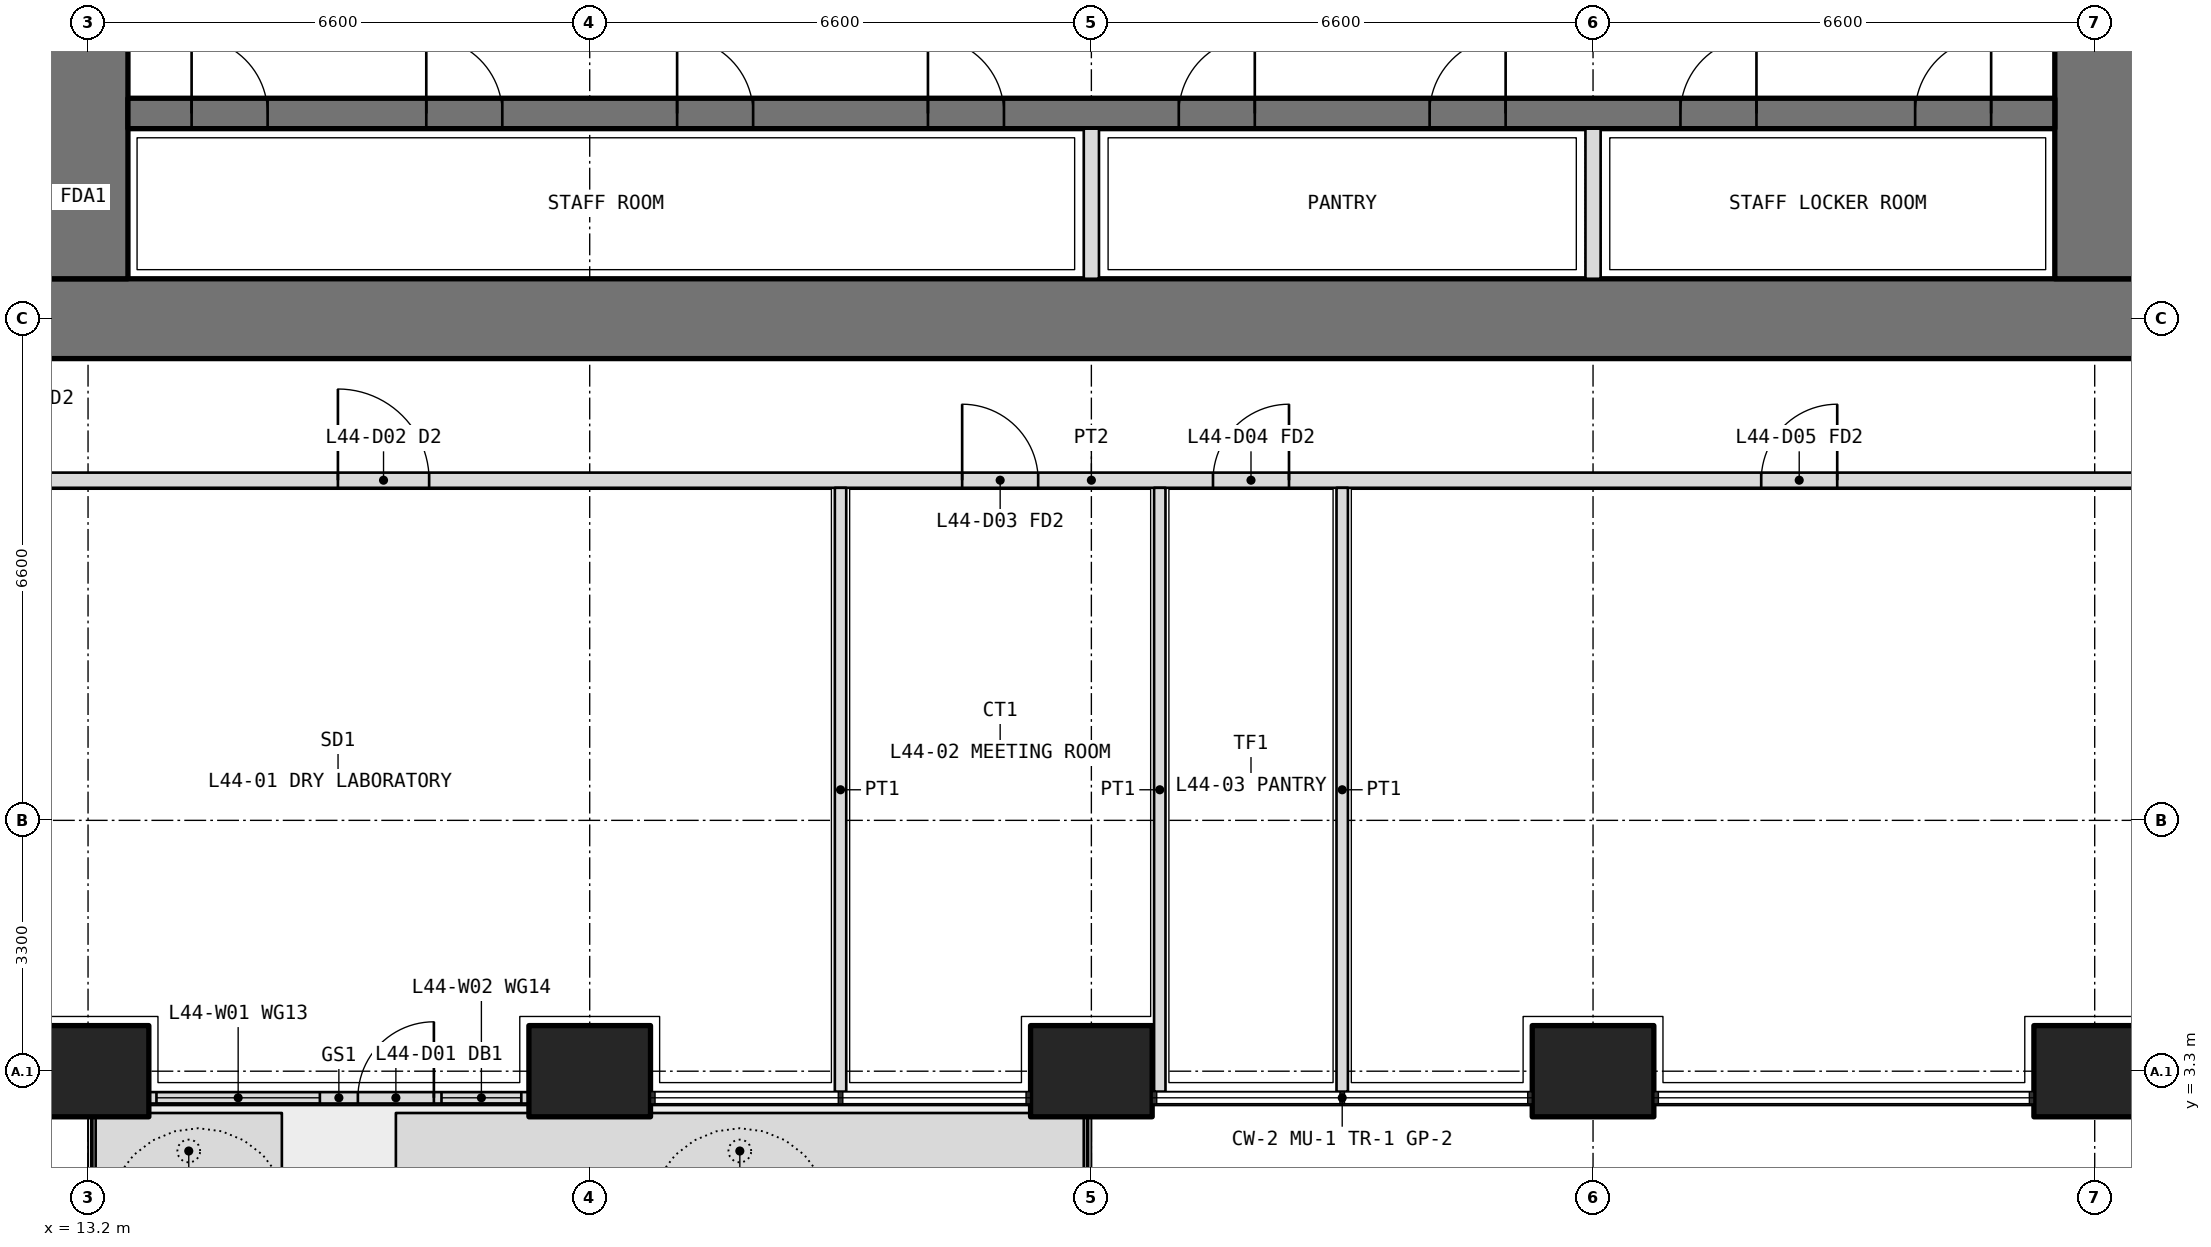
"""IFC4 building model, lengths in metres.
Left out: names, types, materials, properties, quantities, classifications, styles, units other than length and angle.
Written with IfcOpenShell. Run it as: python <this file> out.ifc"""

import sys

from ifc_helpers import new_model, si_unit, direction, frame, frame_2d, origin, origin_2d, place, context, subcontext, project, spatial, polyline, rectangle, outline, extrude, element, fill, save


model = new_model("IFC4")
c1 = context("Model", 3, precision=1e-05, world=origin(), true_north=direction((0.0, 1.0)))
c2 = subcontext(c1, "Body", "Model", "MODEL_VIEW")
j1 = project(units=[si_unit("LENGTHUNIT", "METRE"), si_unit("PLANEANGLEUNIT", "RADIAN")], contexts=[c1])
p1 = place(None, origin())
s1 = spatial("IfcSite", under=j1, at=p1, CompositionType="ELEMENT")
p2 = place(p1, origin())
s2 = spatial("IfcBuilding", under=s1, at=p2, CompositionType="ELEMENT")
p3 = place(p2, frame((0.0, 0.0, 193.5)))
s3 = spatial("IfcBuildingStorey", under=s2, at=p3, CompositionType="ELEMENT", Elevation=193.5)
for number, where, z_axis, x_axis in (
    (1, (13.2, 3.3, 0.0), (0.0, 0.0, 1.0), (1.0, 0.0, 0.0)),
    (2, (19.8, 3.3, 0.0), (0.0, 0.0, 1.0), (1.0, 0.0, 0.0)),
    (3, (26.4, 3.3, 0.0), (0.0, 0.0, 1.0), (1.0, 0.0, 0.0)),
    (4, (33.0, 3.3, 0.0), (0.0, 0.0, 1.0), (1.0, 0.0, 0.0)),
    (5, (39.6, 3.3, 0.0), (0.0, 0.0, 1.0), (1.0, 0.0, 0.0)),
):
    element("IfcColumn", number, at=place(p3, frame(where, z_axis=z_axis, x_axis=x_axis)), inside=s3, PredefinedType="COLUMN", context=c2, shape_type="SweptSolid", body=[
        extrude(rectangle(XDim=1.6, YDim=1.2, at=origin_2d()), origin(), (0.0, 0.0, 1.0), 4.2),
    ])
p4 = place(p3, origin())
e6 = element("IfcWall", 6, at=p4, inside=s3, PredefinedType="USERDEFINED", context=c2, shape_type="SweptSolid", body=[
    extrude(outline(polyline([(13.3, 1.75), (15.75, 1.75), (15.75, 2.75), (13.3, 2.75), (13.3, 1.75)]), holes=[polyline([(13.45, 1.9), (15.6, 1.9), (15.6, 2.6), (13.45, 2.6), (13.45, 1.9)])]), origin(), (0.0, 0.0, 1.0), 1.05),
])
p5 = place(p3, origin())
e7 = element("IfcWall", 7, at=p5, inside=s3, PredefinedType="USERDEFINED", context=c2, shape_type="SweptSolid", body=[
    extrude(outline(polyline([(17.25, 1.75), (26.3, 1.75), (26.3, 2.75), (17.25, 2.75), (17.25, 1.75)]), holes=[polyline([(17.4, 1.9), (26.15, 1.9), (26.15, 2.6), (17.4, 2.6), (17.4, 1.9)])]), origin(), (0.0, 0.0, 1.0), 1.05),
])
p6 = place(p3, frame((14.0, 2.95, 0.0), z_axis=(0.0, 0.0, 1.0), x_axis=(1.0, 0.0, 0.0)))
e8 = element("IfcWall", 8, at=p6, inside=s3, PredefinedType="SOLIDWALL", context=c2, shape_type="SweptSolid", body=[
    extrude(rectangle(XDim=5.0, YDim=0.15, at=frame_2d((2.5, 0.0))), origin(), (0.0, 0.0, 1.0), 2.7),
])
p7 = place(p6, frame((2.75, 0.0, 0.0)))
e9 = element("IfcOpeningElement", 9, at=p7, cuts=e8, PredefinedType="OPENING", context=c2, shape_type="SweptSolid", body=[
    extrude(rectangle(XDim=1.0, YDim=2.4, at=frame_2d((0.5, 1.2))), frame((0.0, 0.085, 0.0), z_axis=(0.0, -1.0, 0.0), x_axis=(1.0, 0.0, 0.0)), (0.0, 0.0, 1.0), 0.17),
])
p8 = place(p6, frame((0.1, 0.0, 0.1)))
e10 = element("IfcOpeningElement", 10, at=p8, cuts=e8, PredefinedType="OPENING", context=c2, shape_type="SweptSolid", body=[
    extrude(rectangle(XDim=2.15, YDim=2.3, at=frame_2d((1.075, 1.15))), frame((0.0, 0.085, 0.0), z_axis=(0.0, -1.0, 0.0), x_axis=(1.0, 0.0, 0.0)), (0.0, 0.0, 1.0), 0.17),
])
p9 = place(p6, frame((3.85, 0.0, 0.1)))
e11 = element("IfcOpeningElement", 11, at=p9, cuts=e8, PredefinedType="OPENING", context=c2, shape_type="SweptSolid", body=[
    extrude(rectangle(XDim=1.05, YDim=2.3, at=frame_2d((0.525, 1.15))), frame((0.0, 0.085, 0.0), z_axis=(0.0, -1.0, 0.0), x_axis=(1.0, 0.0, 0.0)), (0.0, 0.0, 1.0), 0.17),
])
p10 = place(p3, frame((12.675, 13.2, 0.0), z_axis=(0.0, 0.0, 1.0), x_axis=(1.0, 0.0, 0.0)))
e12 = element("IfcWall", 12, at=p10, inside=s3, PredefinedType="SHEAR", context=c2, shape_type="SweptSolid", body=[
    extrude(rectangle(XDim=27.45, YDim=1.05, at=frame_2d((13.725, 0.0))), origin(), (0.0, 0.0, 1.0), 4.2),
])
p11 = place(p3, frame((39.6, 13.725, 0.0), z_axis=(0.0, 0.0, 1.0), x_axis=(0.0, 1.0, 0.0)))
e13 = element("IfcWall", 13, at=p11, inside=s3, PredefinedType="SHEAR", context=c2, shape_type="SweptSolid", body=[
    extrude(rectangle(XDim=18.75, YDim=1.05, at=frame_2d((9.375, 0.0))), origin(), (0.0, 0.0, 1.0), 4.2),
])
p12 = place(p11, frame((3.025, 0.0, 0.0)))
e14 = element("IfcOpeningElement", 14, at=p12, cuts=e13, PredefinedType="OPENING", context=c2, shape_type="SweptSolid", body=[
    extrude(rectangle(XDim=1.6, YDim=2.1, at=frame_2d((0.8, 1.05))), frame((0.0, 0.535, 0.0), z_axis=(0.0, -1.0, 0.0), x_axis=(1.0, 0.0, 0.0)), (0.0, 0.0, 1.0), 1.07),
])
p13 = place(p11, frame((13.825, 0.0, 0.0)))
e15 = element("IfcOpeningElement", 15, at=p13, cuts=e13, PredefinedType="OPENING", context=c2, shape_type="SweptSolid", body=[
    extrude(rectangle(XDim=1.6, YDim=2.1, at=frame_2d((0.8, 1.05))), frame((0.0, 0.535, 0.0), z_axis=(0.0, -1.0, 0.0), x_axis=(1.0, 0.0, 0.0)), (0.0, 0.0, 1.0), 1.07),
])
p14 = place(p3, frame((13.2, 32.475, 0.0), z_axis=(0.0, 0.0, 1.0), x_axis=(0.0, -1.0, 0.0)))
e16 = element("IfcWall", 16, at=p14, inside=s3, PredefinedType="SHEAR", context=c2, shape_type="SweptSolid", body=[
    extrude(rectangle(XDim=18.75, YDim=1.05, at=frame_2d((9.375, 0.0))), origin(), (0.0, 0.0, 1.0), 4.2),
])
p15 = place(p14, frame((14.125, 0.0, 0.0)))
e17 = element("IfcOpeningElement", 17, at=p15, cuts=e16, PredefinedType="OPENING", context=c2, shape_type="SweptSolid", body=[
    extrude(rectangle(XDim=1.6, YDim=2.1, at=frame_2d((0.8, 1.05))), frame((0.0, 0.535, 0.0), z_axis=(0.0, -1.0, 0.0), x_axis=(1.0, 0.0, 0.0)), (0.0, 0.0, 1.0), 1.07),
])
p16 = place(p14, frame((3.325, 0.0, 0.0)))
e18 = element("IfcOpeningElement", 18, at=p16, cuts=e16, PredefinedType="OPENING", context=c2, shape_type="SweptSolid", body=[
    extrude(rectangle(XDim=1.6, YDim=2.1, at=frame_2d((0.8, 1.05))), frame((0.0, 0.535, 0.0), z_axis=(0.0, -1.0, 0.0), x_axis=(1.0, 0.0, 0.0)), (0.0, 0.0, 1.0), 1.07),
])
p17 = place(p3, frame((13.725, 15.9, 0.0), z_axis=(0.0, 0.0, 1.0), x_axis=(1.0, 0.0, 0.0)))
e19 = element("IfcWall", 19, at=p17, inside=s3, PredefinedType="SHEAR", context=c2, shape_type="SweptSolid", body=[
    extrude(rectangle(XDim=25.35, YDim=0.4, at=frame_2d((12.675, 0.0))), origin(), (0.0, 0.0, 1.0), 4.2),
])
p18 = place(p17, frame((0.837, 0.0, 0.0)))
e20 = element("IfcOpeningElement", 20, at=p18, cuts=e19, PredefinedType="OPENING", context=c2, shape_type="SweptSolid", body=[
    extrude(rectangle(XDim=1.0, YDim=2.1, at=frame_2d((0.5, 1.05))), frame((0.0, 0.21, 0.0), z_axis=(0.0, -1.0, 0.0), x_axis=(1.0, 0.0, 0.0)), (0.0, 0.0, 1.0), 0.42),
])
p19 = place(p17, frame((3.925, 0.0, 0.0)))
e21 = element("IfcOpeningElement", 21, at=p19, cuts=e19, PredefinedType="OPENING", context=c2, shape_type="SweptSolid", body=[
    extrude(rectangle(XDim=1.0, YDim=2.1, at=frame_2d((0.5, 1.05))), frame((0.0, 0.21, 0.0), z_axis=(0.0, -1.0, 0.0), x_axis=(1.0, 0.0, 0.0)), (0.0, 0.0, 1.0), 0.42),
])
p20 = place(p17, frame((7.225, 0.0, 0.0)))
e22 = element("IfcOpeningElement", 22, at=p20, cuts=e19, PredefinedType="OPENING", context=c2, shape_type="SweptSolid", body=[
    extrude(rectangle(XDim=1.0, YDim=2.1, at=frame_2d((0.5, 1.05))), frame((0.0, 0.21, 0.0), z_axis=(0.0, -1.0, 0.0), x_axis=(1.0, 0.0, 0.0)), (0.0, 0.0, 1.0), 0.42),
])
p21 = place(p17, frame((10.525, 0.0, 0.0)))
e23 = element("IfcOpeningElement", 23, at=p21, cuts=e19, PredefinedType="OPENING", context=c2, shape_type="SweptSolid", body=[
    extrude(rectangle(XDim=1.0, YDim=2.1, at=frame_2d((0.5, 1.05))), frame((0.0, 0.21, 0.0), z_axis=(0.0, -1.0, 0.0), x_axis=(1.0, 0.0, 0.0)), (0.0, 0.0, 1.0), 0.42),
])
p22 = place(p17, frame((13.825, 0.0, 0.0)))
e24 = element("IfcOpeningElement", 24, at=p22, cuts=e19, PredefinedType="OPENING", context=c2, shape_type="SweptSolid", body=[
    extrude(rectangle(XDim=1.0, YDim=2.1, at=frame_2d((0.5, 1.05))), frame((0.0, 0.21, 0.0), z_axis=(0.0, -1.0, 0.0), x_axis=(1.0, 0.0, 0.0)), (0.0, 0.0, 1.0), 0.42),
])
p23 = place(p17, frame((17.125, 0.0, 0.0)))
e25 = element("IfcOpeningElement", 25, at=p23, cuts=e19, PredefinedType="OPENING", context=c2, shape_type="SweptSolid", body=[
    extrude(rectangle(XDim=1.0, YDim=2.1, at=frame_2d((0.5, 1.05))), frame((0.0, 0.21, 0.0), z_axis=(0.0, -1.0, 0.0), x_axis=(1.0, 0.0, 0.0)), (0.0, 0.0, 1.0), 0.42),
])
p24 = place(p17, frame((20.425, 0.0, 0.0)))
e26 = element("IfcOpeningElement", 26, at=p24, cuts=e19, PredefinedType="OPENING", context=c2, shape_type="SweptSolid", body=[
    extrude(rectangle(XDim=1.0, YDim=2.1, at=frame_2d((0.5, 1.05))), frame((0.0, 0.21, 0.0), z_axis=(0.0, -1.0, 0.0), x_axis=(1.0, 0.0, 0.0)), (0.0, 0.0, 1.0), 0.42),
])
p25 = place(p17, frame((23.512, 0.0, 0.0)))
e27 = element("IfcOpeningElement", 27, at=p25, cuts=e19, PredefinedType="OPENING", context=c2, shape_type="SweptSolid", body=[
    extrude(rectangle(XDim=1.0, YDim=2.1, at=frame_2d((0.5, 1.05))), frame((0.0, 0.21, 0.0), z_axis=(0.0, -1.0, 0.0), x_axis=(1.0, 0.0, 0.0)), (0.0, 0.0, 1.0), 0.42),
])
for number, where, z_axis, x_axis in (
    (28, (26.4, 13.725, 0.0), (0.0, 0.0, 1.0), (0.0, 1.0, 0.0)),
    (29, (33.0, 13.725, 0.0), (0.0, 0.0, 1.0), (0.0, 1.0, 0.0)),
):
    element("IfcWall", number, at=place(p3, frame(where, z_axis=z_axis, x_axis=x_axis)), inside=s3, PredefinedType="PARTITIONING", context=c2, shape_type="SweptSolid", body=[
        extrude(rectangle(XDim=1.975, YDim=0.2, at=frame_2d((0.987, 0.0))), origin(), (0.0, 0.0, 1.0), 4.2),
    ])
p26 = place(p3, frame((10.975, 11.075, 0.0), z_axis=(0.0, 0.0, 1.0), x_axis=(1.0, 0.0, 0.0)))
e30 = element("IfcWall", 30, at=p26, inside=s3, PredefinedType="PARTITIONING", context=c2, shape_type="SweptSolid", body=[
    extrude(rectangle(XDim=30.85, YDim=0.2, at=frame_2d((15.425, 0.0))), origin(), (0.0, 0.0, 1.0), 2.85),
])
p27 = place(p26, frame((5.512, 0.0, 0.0)))
e31 = element("IfcOpeningElement", 31, at=p27, cuts=e30, PredefinedType="OPENING", context=c2, shape_type="SweptSolid", body=[
    extrude(rectangle(XDim=1.2, YDim=2.1, at=frame_2d((0.6, 1.05))), frame((0.0, 0.11, 0.0), z_axis=(0.0, -1.0, 0.0), x_axis=(1.0, 0.0, 0.0)), (0.0, 0.0, 1.0), 0.22),
])
p28 = place(p26, frame((13.725, 0.0, 0.0)))
e32 = element("IfcOpeningElement", 32, at=p28, cuts=e30, PredefinedType="OPENING", context=c2, shape_type="SweptSolid", body=[
    extrude(rectangle(XDim=1.0, YDim=2.1, at=frame_2d((0.5, 1.05))), frame((0.0, 0.11, 0.0), z_axis=(0.0, -1.0, 0.0), x_axis=(1.0, 0.0, 0.0)), (0.0, 0.0, 1.0), 0.22),
])
p29 = place(p26, frame((17.025, 0.0, 0.0)))
e33 = element("IfcOpeningElement", 33, at=p29, cuts=e30, PredefinedType="OPENING", context=c2, shape_type="SweptSolid", body=[
    extrude(rectangle(XDim=1.0, YDim=2.1, at=frame_2d((0.5, 1.05))), frame((0.0, 0.11, 0.0), z_axis=(0.0, -1.0, 0.0), x_axis=(1.0, 0.0, 0.0)), (0.0, 0.0, 1.0), 0.22),
])
p30 = place(p26, frame((24.238, 0.0, 0.0)))
e34 = element("IfcOpeningElement", 34, at=p30, cuts=e30, PredefinedType="OPENING", context=c2, shape_type="SweptSolid", body=[
    extrude(rectangle(XDim=1.0, YDim=2.1, at=frame_2d((0.5, 1.05))), frame((0.0, 0.11, 0.0), z_axis=(0.0, -1.0, 0.0), x_axis=(1.0, 0.0, 0.0)), (0.0, 0.0, 1.0), 0.22),
])
for number, where, z_axis, x_axis in (
    (35, (27.3, 3.03, 0.0), (0.0, 0.0, 1.0), (0.0, 1.0, 0.0)),
    (36, (29.7, 3.03, 0.0), (0.0, 0.0, 1.0), (0.0, 1.0, 0.0)),
    (37, (23.1, 3.03, 0.0), (0.0, 0.0, 1.0), (0.0, 1.0, 0.0)),
):
    element("IfcWall", number, at=place(p3, frame(where, z_axis=z_axis, x_axis=x_axis)), inside=s3, PredefinedType="PARTITIONING", context=c2, shape_type="SweptSolid", body=[
        extrude(rectangle(XDim=7.945, YDim=0.15, at=frame_2d((3.973, 0.0))), origin(), (0.0, 0.0, 1.0), 2.7),
    ])
p31 = place(p7, origin())
e38 = element("IfcDoor", 38, at=p31, inside=s3, OperationType="SINGLE_SWING_RIGHT", PredefinedType="DOOR", context=c2, shape_type="SweptSolid", body=[
    extrude(rectangle(XDim=1.0, YDim=2.4, at=frame_2d((0.5, 1.2))), frame((0.0, 0.025, 0.0), z_axis=(0.0, -1.0, 0.0), x_axis=(1.0, 0.0, 0.0)), (0.0, 0.0, 1.0), 0.05),
])
fill(e9, e38)
p32 = place(p8, origin())
e39 = element("IfcWindow", 39, at=p32, inside=s3, PartitioningType="SINGLE_PANEL", PredefinedType="WINDOW", context=c2, shape_type="SweptSolid", body=[
    extrude(rectangle(XDim=2.15, YDim=2.3, at=frame_2d((1.075, 1.15))), frame((0.0, 0.03, 0.0), z_axis=(0.0, -1.0, 0.0), x_axis=(1.0, 0.0, 0.0)), (0.0, 0.0, 1.0), 0.06),
])
fill(e10, e39)
p33 = place(p9, origin())
e40 = element("IfcWindow", 40, at=p33, inside=s3, PartitioningType="SINGLE_PANEL", PredefinedType="WINDOW", context=c2, shape_type="SweptSolid", body=[
    extrude(rectangle(XDim=1.05, YDim=2.3, at=frame_2d((0.525, 1.15))), frame((0.0, 0.03, 0.0), z_axis=(0.0, -1.0, 0.0), x_axis=(1.0, 0.0, 0.0)), (0.0, 0.0, 1.0), 0.06),
])
fill(e11, e40)
p34 = place(p27, origin())
e41 = element("IfcDoor", 41, at=p34, inside=s3, OperationType="DOUBLE_DOOR_SINGLE_SWING", PredefinedType="DOOR", context=c2, shape_type="SweptSolid", body=[
    extrude(rectangle(XDim=1.2, YDim=2.1, at=frame_2d((0.6, 1.05))), frame((0.0, 0.025, 0.0), z_axis=(0.0, -1.0, 0.0), x_axis=(1.0, 0.0, 0.0)), (0.0, 0.0, 1.0), 0.05),
])
fill(e31, e41)
p35 = place(p28, origin())
e42 = element("IfcDoor", 42, at=p35, inside=s3, OperationType="SINGLE_SWING_LEFT", PredefinedType="DOOR", context=c2, shape_type="SweptSolid", body=[
    extrude(rectangle(XDim=1.0, YDim=2.1, at=frame_2d((0.5, 1.05))), frame((0.0, 0.025, 0.0), z_axis=(0.0, -1.0, 0.0), x_axis=(1.0, 0.0, 0.0)), (0.0, 0.0, 1.0), 0.05),
])
fill(e32, e42)
p36 = place(p29, origin())
e43 = element("IfcDoor", 43, at=p36, inside=s3, OperationType="SINGLE_SWING_RIGHT", PredefinedType="DOOR", context=c2, shape_type="SweptSolid", body=[
    extrude(rectangle(XDim=1.0, YDim=2.1, at=frame_2d((0.5, 1.05))), frame((0.0, 0.025, 0.0), z_axis=(0.0, -1.0, 0.0), x_axis=(1.0, 0.0, 0.0)), (0.0, 0.0, 1.0), 0.05),
])
fill(e33, e43)
p37 = place(p30, origin())
e44 = element("IfcDoor", 44, at=p37, inside=s3, OperationType="SINGLE_SWING_RIGHT", PredefinedType="DOOR", context=c2, shape_type="SweptSolid", body=[
    extrude(rectangle(XDim=1.0, YDim=2.1, at=frame_2d((0.5, 1.05))), frame((0.0, 0.025, 0.0), z_axis=(0.0, -1.0, 0.0), x_axis=(1.0, 0.0, 0.0)), (0.0, 0.0, 1.0), 0.05),
])
fill(e34, e44)
p38 = place(p18, origin())
e45 = element("IfcDoor", 45, at=p38, inside=s3, OperationType="SINGLE_SWING_LEFT", PredefinedType="DOOR", context=c2, shape_type="SweptSolid", body=[
    extrude(rectangle(XDim=1.0, YDim=2.1, at=frame_2d((0.5, 1.05))), frame((0.0, 0.025, 0.0), z_axis=(0.0, -1.0, 0.0), x_axis=(1.0, 0.0, 0.0)), (0.0, 0.0, 1.0), 0.05),
])
fill(e20, e45)
p39 = place(p19, origin())
e46 = element("IfcDoor", 46, at=p39, inside=s3, OperationType="SINGLE_SWING_LEFT", PredefinedType="DOOR", context=c2, shape_type="SweptSolid", body=[
    extrude(rectangle(XDim=1.0, YDim=2.1, at=frame_2d((0.5, 1.05))), frame((0.0, 0.025, 0.0), z_axis=(0.0, -1.0, 0.0), x_axis=(1.0, 0.0, 0.0)), (0.0, 0.0, 1.0), 0.05),
])
fill(e21, e46)
p40 = place(p20, origin())
e47 = element("IfcDoor", 47, at=p40, inside=s3, OperationType="SINGLE_SWING_LEFT", PredefinedType="DOOR", context=c2, shape_type="SweptSolid", body=[
    extrude(rectangle(XDim=1.0, YDim=2.1, at=frame_2d((0.5, 1.05))), frame((0.0, 0.025, 0.0), z_axis=(0.0, -1.0, 0.0), x_axis=(1.0, 0.0, 0.0)), (0.0, 0.0, 1.0), 0.05),
])
fill(e22, e47)
p41 = place(p21, origin())
e48 = element("IfcDoor", 48, at=p41, inside=s3, OperationType="SINGLE_SWING_LEFT", PredefinedType="DOOR", context=c2, shape_type="SweptSolid", body=[
    extrude(rectangle(XDim=1.0, YDim=2.1, at=frame_2d((0.5, 1.05))), frame((0.0, 0.025, 0.0), z_axis=(0.0, -1.0, 0.0), x_axis=(1.0, 0.0, 0.0)), (0.0, 0.0, 1.0), 0.05),
])
fill(e23, e48)
p42 = place(p22, origin())
e49 = element("IfcDoor", 49, at=p42, inside=s3, OperationType="SINGLE_SWING_RIGHT", PredefinedType="DOOR", context=c2, shape_type="SweptSolid", body=[
    extrude(rectangle(XDim=1.0, YDim=2.1, at=frame_2d((0.5, 1.05))), frame((0.0, 0.025, 0.0), z_axis=(0.0, -1.0, 0.0), x_axis=(1.0, 0.0, 0.0)), (0.0, 0.0, 1.0), 0.05),
])
fill(e24, e49)
p43 = place(p23, origin())
e50 = element("IfcDoor", 50, at=p43, inside=s3, OperationType="SINGLE_SWING_RIGHT", PredefinedType="DOOR", context=c2, shape_type="SweptSolid", body=[
    extrude(rectangle(XDim=1.0, YDim=2.1, at=frame_2d((0.5, 1.05))), frame((0.0, 0.025, 0.0), z_axis=(0.0, -1.0, 0.0), x_axis=(1.0, 0.0, 0.0)), (0.0, 0.0, 1.0), 0.05),
])
fill(e25, e50)
p44 = place(p24, origin())
e51 = element("IfcDoor", 51, at=p44, inside=s3, OperationType="SINGLE_SWING_RIGHT", PredefinedType="DOOR", context=c2, shape_type="SweptSolid", body=[
    extrude(rectangle(XDim=1.0, YDim=2.1, at=frame_2d((0.5, 1.05))), frame((0.0, 0.025, 0.0), z_axis=(0.0, -1.0, 0.0), x_axis=(1.0, 0.0, 0.0)), (0.0, 0.0, 1.0), 0.05),
])
fill(e26, e51)
p45 = place(p25, origin())
e52 = element("IfcDoor", 52, at=p45, inside=s3, OperationType="SINGLE_SWING_RIGHT", PredefinedType="DOOR", context=c2, shape_type="SweptSolid", body=[
    extrude(rectangle(XDim=1.0, YDim=2.1, at=frame_2d((0.5, 1.05))), frame((0.0, 0.025, 0.0), z_axis=(0.0, -1.0, 0.0), x_axis=(1.0, 0.0, 0.0)), (0.0, 0.0, 1.0), 0.05),
])
fill(e27, e52)
save(model, sys.argv[1])
